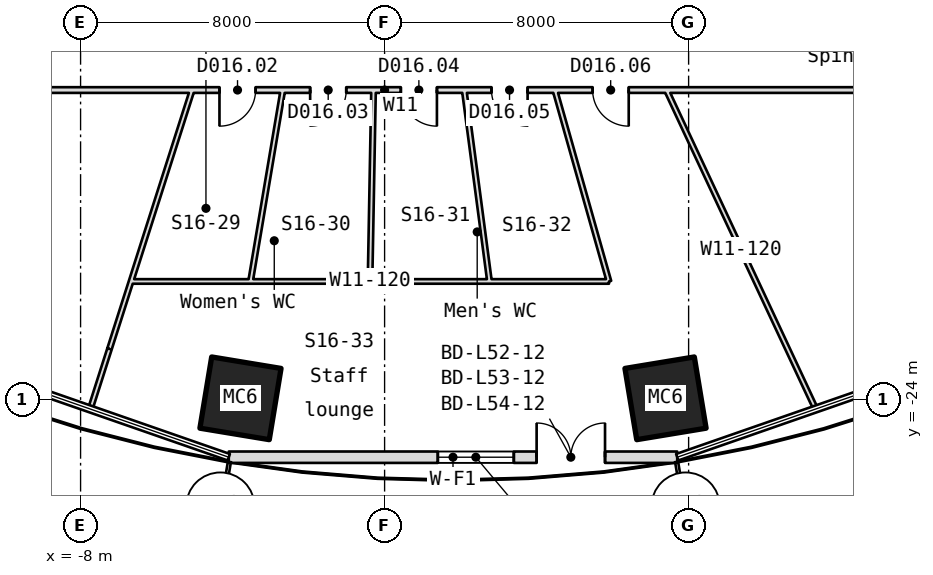
"""IFC4 building model, lengths in metres.
Left out: names, types, materials, properties, quantities, classifications, styles, units other than length and angle.
Written with IfcOpenShell. Run it as: python <this file> out.ifc"""

import sys

from ifc_helpers import new_model, si_unit, direction, frame, frame_2d, origin, origin_2d, place, context, subcontext, project, spatial, rectangle, hollow_rectangle, extrude, element, fill, save


model = new_model("IFC4")
c1 = context("Model", 3, precision=1e-05, world=origin(), true_north=direction((0.0, 1.0)))
c2 = subcontext(c1, "Body", "Model", "MODEL_VIEW")
j1 = project(units=[si_unit("LENGTHUNIT", "METRE"), si_unit("PLANEANGLEUNIT", "RADIAN")], contexts=[c1])
p1 = place(None, origin())
s1 = spatial("IfcSite", under=j1, at=p1, CompositionType="ELEMENT")
p2 = place(p1, origin())
s2 = spatial("IfcBuilding", under=s1, at=p2, CompositionType="ELEMENT")
p3 = place(p2, frame((0.0, 0.0, 235.75)))
s3 = spatial("IfcBuildingStorey", under=s2, at=p3, CompositionType="ELEMENT", Elevation=235.75)
for number, where, z_axis, x_axis in (
    (1, (-3.792, -23.961, -0.18), (0.0, 0.0, 1.0), (-0.987, 0.163, 0.0)),
    (2, (7.392, -23.961, -0.18), (0.0, 0.0, 1.0), (-0.987, -0.163, 0.0)),
):
    element("IfcColumn", number, at=place(p3, frame(where, z_axis=z_axis, x_axis=x_axis)), inside=s3, PredefinedType="COLUMN", context=c2, shape_type="SweptSolid", body=[
        extrude(hollow_rectangle(XDim=1.85, YDim=1.9, WallThickness=0.065, at=origin_2d()), origin(), (0.0, 0.0, 1.0), 4.15),
    ])
p4 = place(p3, frame((-4.101, -25.511, 0.0), z_axis=(0.0, 0.0, 1.0), x_axis=(1.0, 0.0, 0.0)))
e3 = element("IfcWall", 3, at=p4, inside=s3, PredefinedType="SOLIDWALL", context=c2, shape_type="SweptSolid", body=[
    extrude(rectangle(XDim=11.801, YDim=0.3, at=frame_2d((5.9, 0.0))), origin(), (0.0, 0.0, 1.0), 3.97),
])
p5 = place(p4, frame((8.101, 0.0, 0.0)))
e4 = element("IfcOpeningElement", 4, at=p5, cuts=e3, PredefinedType="OPENING", context=c2, shape_type="SweptSolid", body=[
    extrude(rectangle(XDim=1.8, YDim=2.4, at=frame_2d((0.9, 1.2))), frame((0.0, 0.16, 0.0), z_axis=(0.0, -1.0, 0.0), x_axis=(1.0, 0.0, 0.0)), (0.0, 0.0, 1.0), 0.32),
])
p6 = place(p4, frame((5.501, 0.0, 0.9)))
e5 = element("IfcOpeningElement", 5, at=p6, cuts=e3, PredefinedType="OPENING", context=c2, shape_type="SweptSolid", body=[
    extrude(rectangle(XDim=2.0, YDim=1.5, at=frame_2d((1.0, 0.75))), frame((0.0, 0.16, 0.0), z_axis=(0.0, -1.0, 0.0), x_axis=(1.0, 0.0, 0.0)), (0.0, 0.0, 1.0), 0.32),
])
p7 = place(p3, frame((-6.672, -20.886, 0.0), z_axis=(0.0, 0.0, 1.0), x_axis=(1.0, 0.0, 0.0)))
e6 = element("IfcWall", 6, at=p7, inside=s3, PredefinedType="PARTITIONING", context=c2, shape_type="SweptSolid", body=[
    extrude(rectangle(XDim=12.576, YDim=0.12, at=frame_2d((6.288, 0.0))), origin(), (0.0, 0.0, 1.0), 3.97),
])
p8 = place(p3, frame((-5.063, -15.85, 0.0), z_axis=(0.0, 0.0, 1.0), x_axis=(-0.30428402172, -0.952581353022, 0.0)))
e7 = element("IfcWall", 7, at=p8, inside=s3, PredefinedType="PARTITIONING", context=c2, shape_type="SweptSolid", body=[
    extrude(rectangle(XDim=7.153, YDim=0.12, at=frame_2d((3.576, 0.0))), origin(), (0.0, 0.0, 1.0), 3.503),
])
p9 = place(p3, frame((-7.24, -22.664, 0.0), z_axis=(0.0, 0.0, 1.0), x_axis=(-0.304278938766, -0.95258297666, 0.0)))
e8 = element("IfcWall", 8, at=p9, inside=s3, PredefinedType="PARTITIONING", context=c2, shape_type="SweptSolid", body=[
    extrude(rectangle(XDim=1.658, YDim=0.12, at=frame_2d((0.829, 0.0))), origin(), (0.0, 0.0, 1.0), 3.97),
])
p10 = place(p3, frame((-3.528, -20.886, 0.0), z_axis=(0.0, 0.0, 1.0), x_axis=(0.166538009688, 0.986035035548, 0.0)))
e9 = element("IfcWall", 9, at=p10, inside=s3, PredefinedType="PARTITIONING", context=c2, shape_type="SweptSolid", body=[
    extrude(rectangle(XDim=5.107, YDim=0.12, at=frame_2d((2.554, 0.0))), origin(), (0.0, 0.0, 1.0), 3.97),
])
p11 = place(p3, frame((-0.384, -20.886, 0.0), z_axis=(0.0, 0.0, 1.0), x_axis=(0.018369984808, 0.999831257592, 0.0)))
e10 = element("IfcWall", 10, at=p11, inside=s3, PredefinedType="PARTITIONING", context=c2, shape_type="SweptSolid", body=[
    extrude(rectangle(XDim=5.037, YDim=0.12, at=frame_2d((2.519, 0.0))), origin(), (0.0, 0.0, 1.0), 3.97),
])
p12 = place(p3, frame((2.76, -20.886, 0.0), z_axis=(0.0, 0.0, 1.0), x_axis=(-0.131011450979, 0.991380855026, 0.0)))
e11 = element("IfcWall", 11, at=p12, inside=s3, PredefinedType="PARTITIONING", context=c2, shape_type="SweptSolid", body=[
    extrude(rectangle(XDim=5.08, YDim=0.12, at=frame_2d((2.54, 0.0))), origin(), (0.0, 0.0, 1.0), 3.97),
])
p13 = place(p3, frame((5.905, -20.886, 0.0), z_axis=(0.0, 0.0, 1.0), x_axis=(-0.272058427556, 0.962280734503, 0.0)))
e12 = element("IfcWall", 12, at=p13, inside=s3, PredefinedType="PARTITIONING", context=c2, shape_type="SweptSolid", body=[
    extrude(rectangle(XDim=5.234, YDim=0.12, at=frame_2d((2.617, 0.0))), origin(), (0.0, 0.0, 1.0), 3.97),
])
p14 = place(p3, frame((7.417, -15.85, 0.0), z_axis=(0.0, 0.0, 1.0), x_axis=(0.423847224257, -0.905733697336, 0.0)))
e13 = element("IfcWall", 13, at=p14, inside=s3, PredefinedType="PARTITIONING", context=c2, shape_type="SweptSolid", body=[
    extrude(rectangle(XDim=9.267, YDim=0.12, at=frame_2d((4.633, 0.0))), origin(), (0.0, 0.0, 1.0), 3.97),
])
p15 = place(p3, frame((18.85, -15.85, 0.0), z_axis=(0.0, 0.0, 1.0), x_axis=(-1.0, 0.0, 0.0)))
e14 = element("IfcWall", 14, at=p15, inside=s3, PredefinedType="PARTITIONING", context=c2, shape_type="SweptSolid", body=[
    extrude(rectangle(XDim=37.7, YDim=0.15, at=frame_2d((18.85, 0.0))), origin(), (0.0, 0.0, 1.0), 3.97),
])
p16 = place(p15, frame((30.332, 0.0, 0.0)))
e15 = element("IfcOpeningElement", 15, at=p16, cuts=e14, PredefinedType="OPENING", context=c2, shape_type="SweptSolid", body=[
    extrude(rectangle(XDim=0.95, YDim=2.1, at=frame_2d((0.475, 1.05))), frame((0.0, 0.085, 0.0), z_axis=(0.0, -1.0, 0.0), x_axis=(1.0, 0.0, 0.0)), (0.0, 0.0, 1.0), 0.17),
])
p17 = place(p15, frame((22.245, 0.0, 0.0)))
e16 = element("IfcOpeningElement", 16, at=p17, cuts=e14, PredefinedType="OPENING", context=c2, shape_type="SweptSolid", body=[
    extrude(rectangle(XDim=0.95, YDim=2.1, at=frame_2d((0.475, 1.05))), frame((0.0, 0.085, 0.0), z_axis=(0.0, -1.0, 0.0), x_axis=(1.0, 0.0, 0.0)), (0.0, 0.0, 1.0), 0.17),
])
p18 = place(p15, frame((19.859, 0.0, 0.0)))
e17 = element("IfcOpeningElement", 17, at=p18, cuts=e14, PredefinedType="OPENING", context=c2, shape_type="SweptSolid", body=[
    extrude(rectangle(XDim=0.95, YDim=2.1, at=frame_2d((0.475, 1.05))), frame((0.0, 0.085, 0.0), z_axis=(0.0, -1.0, 0.0), x_axis=(1.0, 0.0, 0.0)), (0.0, 0.0, 1.0), 0.17),
])
p19 = place(p15, frame((17.473, 0.0, 0.0)))
e18 = element("IfcOpeningElement", 18, at=p19, cuts=e14, PredefinedType="OPENING", context=c2, shape_type="SweptSolid", body=[
    extrude(rectangle(XDim=0.95, YDim=2.1, at=frame_2d((0.475, 1.05))), frame((0.0, 0.085, 0.0), z_axis=(0.0, -1.0, 0.0), x_axis=(1.0, 0.0, 0.0)), (0.0, 0.0, 1.0), 0.17),
])
p20 = place(p15, frame((15.087, 0.0, 0.0)))
e19 = element("IfcOpeningElement", 19, at=p20, cuts=e14, PredefinedType="OPENING", context=c2, shape_type="SweptSolid", body=[
    extrude(rectangle(XDim=0.95, YDim=2.1, at=frame_2d((0.475, 1.05))), frame((0.0, 0.085, 0.0), z_axis=(0.0, -1.0, 0.0), x_axis=(1.0, 0.0, 0.0)), (0.0, 0.0, 1.0), 0.17),
])
p21 = place(p15, frame((12.426, 0.0, 0.0)))
e20 = element("IfcOpeningElement", 20, at=p21, cuts=e14, PredefinedType="OPENING", context=c2, shape_type="SweptSolid", body=[
    extrude(rectangle(XDim=0.95, YDim=2.1, at=frame_2d((0.475, 1.05))), frame((0.0, 0.085, 0.0), z_axis=(0.0, -1.0, 0.0), x_axis=(1.0, 0.0, 0.0)), (0.0, 0.0, 1.0), 0.17),
])
p22 = place(p5, origin())
e21 = element("IfcDoor", 21, at=p22, inside=s3, OperationType="SINGLE_SWING_LEFT", PredefinedType="DOOR", context=c2, shape_type="SweptSolid", body=[
    extrude(rectangle(XDim=1.8, YDim=2.4, at=frame_2d((0.9, 1.2))), frame((0.0, 0.025, 0.0), z_axis=(0.0, -1.0, 0.0), x_axis=(1.0, 0.0, 0.0)), (0.0, 0.0, 1.0), 0.05),
])
fill(e4, e21)
p23 = place(p6, origin())
e22 = element("IfcWindow", 22, at=p23, inside=s3, PartitioningType="SINGLE_PANEL", PredefinedType="WINDOW", context=c2, shape_type="SweptSolid", body=[
    extrude(rectangle(XDim=2.0, YDim=1.5, at=frame_2d((1.0, 0.75))), frame((0.0, 0.03, 0.0), z_axis=(0.0, -1.0, 0.0), x_axis=(1.0, 0.0, 0.0)), (0.0, 0.0, 1.0), 0.06),
])
fill(e5, e22)
p24 = place(p17, origin())
e23 = element("IfcDoor", 23, at=p24, inside=s3, OperationType="SINGLE_SWING_RIGHT", PredefinedType="DOOR", context=c2, shape_type="SweptSolid", body=[
    extrude(rectangle(XDim=0.95, YDim=2.1, at=frame_2d((0.475, 1.05))), frame((0.0, 0.025, 0.0), z_axis=(0.0, -1.0, 0.0), x_axis=(1.0, 0.0, 0.0)), (0.0, 0.0, 1.0), 0.05),
])
fill(e16, e23)
p25 = place(p18, origin())
e24 = element("IfcDoor", 24, at=p25, inside=s3, OperationType="SINGLE_SWING_RIGHT", PredefinedType="DOOR", context=c2, shape_type="SweptSolid", body=[
    extrude(rectangle(XDim=0.95, YDim=2.1, at=frame_2d((0.475, 1.05))), frame((0.0, 0.025, 0.0), z_axis=(0.0, -1.0, 0.0), x_axis=(1.0, 0.0, 0.0)), (0.0, 0.0, 1.0), 0.05),
])
fill(e17, e24)
p26 = place(p19, origin())
e25 = element("IfcDoor", 25, at=p26, inside=s3, OperationType="SINGLE_SWING_RIGHT", PredefinedType="DOOR", context=c2, shape_type="SweptSolid", body=[
    extrude(rectangle(XDim=0.95, YDim=2.1, at=frame_2d((0.475, 1.05))), frame((0.0, 0.025, 0.0), z_axis=(0.0, -1.0, 0.0), x_axis=(1.0, 0.0, 0.0)), (0.0, 0.0, 1.0), 0.05),
])
fill(e18, e25)
p27 = place(p20, origin())
e26 = element("IfcDoor", 26, at=p27, inside=s3, OperationType="SINGLE_SWING_RIGHT", PredefinedType="DOOR", context=c2, shape_type="SweptSolid", body=[
    extrude(rectangle(XDim=0.95, YDim=2.1, at=frame_2d((0.475, 1.05))), frame((0.0, 0.025, 0.0), z_axis=(0.0, -1.0, 0.0), x_axis=(1.0, 0.0, 0.0)), (0.0, 0.0, 1.0), 0.05),
])
fill(e19, e26)
p28 = place(p21, origin())
e27 = element("IfcDoor", 27, at=p28, inside=s3, OperationType="SINGLE_SWING_RIGHT", PredefinedType="DOOR", context=c2, shape_type="SweptSolid", body=[
    extrude(rectangle(XDim=0.95, YDim=2.1, at=frame_2d((0.475, 1.05))), frame((0.0, 0.025, 0.0), z_axis=(0.0, -1.0, 0.0), x_axis=(1.0, 0.0, 0.0)), (0.0, 0.0, 1.0), 0.05),
])
fill(e20, e27)
save(model, sys.argv[1])
